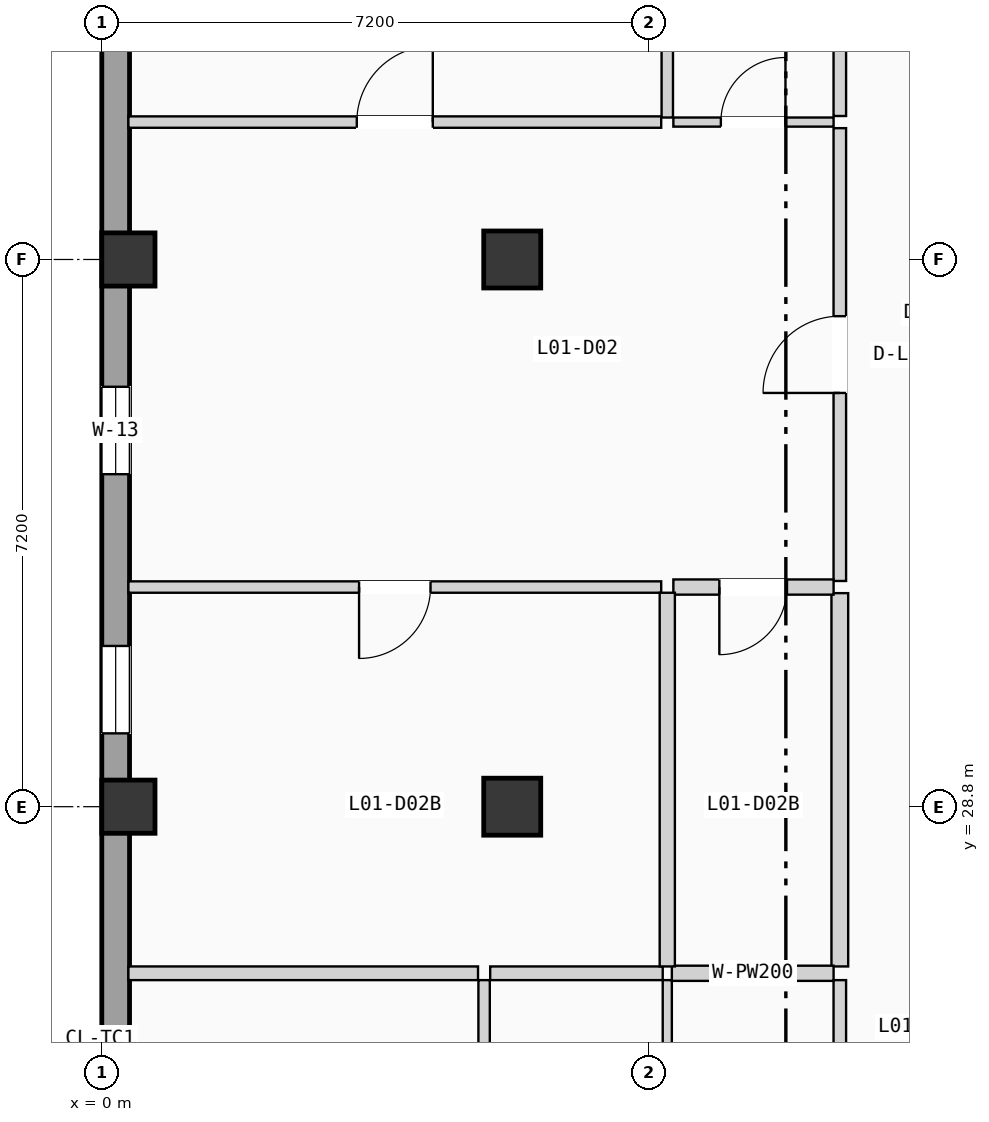
"""IFC4 building model, lengths in metres.
Left out: names, types, materials, properties, quantities, classifications, styles, units other than length and angle.
Written with IfcOpenShell. Run it as: python <this file> out.ifc"""

import sys

from ifc_helpers import new_model, si_unit, direction, frame, frame_2d, origin, origin_2d, place, context, subcontext, project, spatial, rectangle, extrude, element, fill, save


model = new_model("IFC4")
c1 = context("Model", 3, precision=1e-05, world=origin(), true_north=direction((0.0, 1.0)))
c2 = subcontext(c1, "Body", "Model", "MODEL_VIEW")
j1 = project(units=[si_unit("LENGTHUNIT", "METRE"), si_unit("PLANEANGLEUNIT", "RADIAN")], contexts=[c1])
p1 = place(None, origin())
s1 = spatial("IfcSite", under=j1, at=p1, CompositionType="ELEMENT")
p2 = place(p1, origin())
s2 = spatial("IfcBuilding", under=s1, at=p2, CompositionType="ELEMENT")
p3 = place(p2, frame((0.0, 0.0, 4.9)))
s3 = spatial("IfcBuildingStorey", under=s2, at=p3, CompositionType="ELEMENT", Elevation=4.9)
for number, where, z_axis, x_axis in (
    (1, (0.35, 28.8, 0.0), (0.0, 0.0, 1.0), (1.0, 0.0, 0.0)),
    (2, (0.35, 36.0, 0.0), (0.0, 0.0, 1.0), (1.0, 0.0, 0.0)),
):
    element("IfcColumn", number, at=place(p3, frame(where, z_axis=z_axis, x_axis=x_axis)), inside=s3, PredefinedType="COLUMN", context=c2, shape_type="SweptSolid", body=[
        extrude(rectangle(XDim=0.7, YDim=0.7, at=origin_2d()), origin(), (0.0, 0.0, 1.0), 3.675),
    ])
for number, where, z_axis, x_axis in (
    (3, (5.4, 28.8, 0.0), (0.0, 0.0, 1.0), (1.0, 0.0, 0.0)),
    (4, (5.4, 36.0, 0.0), (0.0, 0.0, 1.0), (1.0, 0.0, 0.0)),
):
    element("IfcColumn", number, at=place(p3, frame(where, z_axis=z_axis, x_axis=x_axis)), inside=s3, PredefinedType="COLUMN", context=c2, shape_type="SweptSolid", body=[
        extrude(rectangle(XDim=0.75, YDim=0.75, at=origin_2d()), origin(), (0.0, 0.0, 1.0), 3.675),
    ])
p4 = place(p3, frame((0.183, 0.365, 0.0), z_axis=(0.0, 0.0, 1.0), x_axis=(0.0, 1.0, 0.0)))
e5 = element("IfcWall", 5, at=p4, inside=s3, PredefinedType="SOLIDWALL", context=c2, shape_type="SweptSolid", body=[
    extrude(rectangle(XDim=49.67, YDim=0.365, at=frame_2d((24.835, 0.0))), origin(), (0.0, 0.0, 1.0), 3.415),
])
p5 = place(p4, frame((16.732, 0.0, 0.9)))
e6 = element("IfcOpeningElement", 6, at=p5, cuts=e5, PredefinedType="OPENING", context=c2, shape_type="SweptSolid", body=[
    extrude(rectangle(XDim=1.05, YDim=1.8, at=frame_2d((0.525, 0.9))), frame((0.0, 0.192, 0.0), z_axis=(0.0, -1.0, 0.0), x_axis=(1.0, 0.0, 0.0)), (0.0, 0.0, 1.0), 0.385),
])
p6 = place(p4, frame((9.553, 0.0, 0.9)))
e7 = element("IfcOpeningElement", 7, at=p6, cuts=e5, PredefinedType="OPENING", context=c2, shape_type="SweptSolid", body=[
    extrude(rectangle(XDim=1.15, YDim=1.2, at=frame_2d((0.575, 0.6))), frame((0.0, 0.192, 0.0), z_axis=(0.0, -1.0, 0.0), x_axis=(1.0, 0.0, 0.0)), (0.0, 0.0, 1.0), 0.385),
])
p7 = place(p4, frame((23.254, 0.0, 0.9)))
e8 = element("IfcOpeningElement", 8, at=p7, cuts=e5, PredefinedType="OPENING", context=c2, shape_type="SweptSolid", body=[
    extrude(rectangle(XDim=1.15, YDim=1.35, at=frame_2d((0.575, 0.675))), frame((0.0, 0.192, 0.0), z_axis=(0.0, -1.0, 0.0), x_axis=(1.0, 0.0, 0.0)), (0.0, 0.0, 1.0), 0.385),
])
p8 = place(p4, frame((32.81, 0.0, 0.9)))
e9 = element("IfcOpeningElement", 9, at=p8, cuts=e5, PredefinedType="OPENING", context=c2, shape_type="SweptSolid", body=[
    extrude(rectangle(XDim=1.15, YDim=1.5, at=frame_2d((0.575, 0.75))), frame((0.0, 0.192, 0.0), z_axis=(0.0, -1.0, 0.0), x_axis=(1.0, 0.0, 0.0)), (0.0, 0.0, 1.0), 0.385),
])
p9 = place(p4, frame((29.4, 0.0, 0.9)))
e10 = element("IfcOpeningElement", 10, at=p9, cuts=e5, PredefinedType="OPENING", context=c2, shape_type="SweptSolid", body=[
    extrude(rectangle(XDim=1.15, YDim=1.65, at=frame_2d((0.575, 0.825))), frame((0.0, 0.192, 0.0), z_axis=(0.0, -1.0, 0.0), x_axis=(1.0, 0.0, 0.0)), (0.0, 0.0, 1.0), 0.385),
])
p10 = place(p4, frame((39.404, 0.0, 0.9)))
e11 = element("IfcOpeningElement", 11, at=p10, cuts=e5, PredefinedType="OPENING", context=c2, shape_type="SweptSolid", body=[
    extrude(rectangle(XDim=1.15, YDim=1.8, at=frame_2d((0.575, 0.9))), frame((0.0, 0.192, 0.0), z_axis=(0.0, -1.0, 0.0), x_axis=(1.0, 0.0, 0.0)), (0.0, 0.0, 1.0), 0.385),
])
p11 = place(p3, frame((9.71, 20.733, 0.0), z_axis=(0.0, 0.0, 1.0), x_axis=(0.0, 1.0, 0.0)))
e12 = element("IfcWall", 12, at=p11, inside=s3, PredefinedType="PARTITIONING", context=c2, shape_type="SweptSolid", body=[
    extrude(rectangle(XDim=5.785, YDim=0.165, at=frame_2d((2.893, 0.0))), origin(), (0.0, 0.0, 1.0), 3.395),
])
p12 = place(p3, frame((9.71, 31.77, 0.0), z_axis=(0.0, 0.0, 1.0), x_axis=(0.0, 1.0, 0.0)))
e13 = element("IfcWall", 13, at=p12, inside=s3, PredefinedType="PARTITIONING", context=c2, shape_type="SweptSolid", body=[
    extrude(rectangle(XDim=5.958, YDim=0.165, at=frame_2d((2.979, 0.0))), origin(), (0.0, 0.0, 1.0), 3.395),
])
p13 = place(p12, frame((2.474, 0.0, 0.0)))
e14 = element("IfcOpeningElement", 14, at=p13, cuts=e13, PredefinedType="OPENING", context=c2, shape_type="SweptSolid", body=[
    extrude(rectangle(XDim=1.01, YDim=2.11, at=frame_2d((0.505, 1.055))), frame((0.0, 0.093, 0.0), z_axis=(0.0, -1.0, 0.0), x_axis=(1.0, 0.0, 0.0)), (0.0, 0.0, 1.0), 0.185),
])
p14 = place(p3, frame((9.71, 26.698, 0.0), z_axis=(0.0, 0.0, 1.0), x_axis=(0.0, 1.0, 0.0)))
e15 = element("IfcWall", 15, at=p14, inside=s3, PredefinedType="PLUMBINGWALL", context=c2, shape_type="SweptSolid", body=[
    extrude(rectangle(XDim=4.912, YDim=0.22, at=frame_2d((2.456, 0.0))), origin(), (0.0, 0.0, 1.0), 3.395),
])
p15 = place(p3, frame((9.71, 37.888, 0.0), z_axis=(0.0, 0.0, 1.0), x_axis=(0.0, 1.0, 0.0)))
e16 = element("IfcWall", 16, at=p15, inside=s3, PredefinedType="PARTITIONING", context=c2, shape_type="SweptSolid", body=[
    extrude(rectangle(XDim=4.912, YDim=0.165, at=frame_2d((2.456, 0.0))), origin(), (0.0, 0.0, 1.0), 3.395),
])
p16 = place(p3, frame((7.44, 20.713, 0.0), z_axis=(0.0, 0.0, 1.0), x_axis=(0.0, 1.0, 0.0)))
e17 = element("IfcWall", 17, at=p16, inside=s3, PredefinedType="PARTITIONING", context=c2, shape_type="SweptSolid", body=[
    extrude(rectangle(XDim=5.805, YDim=0.12, at=frame_2d((2.903, 0.0))), origin(), (0.0, 0.0, 1.0), 3.395),
])
p17 = place(p3, frame((7.5, 26.608, 0.0), z_axis=(0.0, 0.0, 1.0), x_axis=(1.0, 0.0, 0.0)))
e18 = element("IfcWall", 18, at=p17, inside=s3, PredefinedType="PLUMBINGWALL", context=c2, shape_type="SweptSolid", body=[
    extrude(rectangle(XDim=2.128, YDim=0.2, at=frame_2d((1.064, 0.0))), origin(), (0.0, 0.0, 1.0), 3.395),
])
p18 = place(p3, frame((5.03, 20.728, 0.0), z_axis=(0.0, 0.0, 1.0), x_axis=(0.0, 1.0, 0.0)))
e19 = element("IfcWall", 19, at=p18, inside=s3, PredefinedType="PARTITIONING", context=c2, shape_type="SweptSolid", body=[
    extrude(rectangle(XDim=5.79, YDim=0.15, at=frame_2d((2.895, 0.0))), origin(), (0.0, 0.0, 1.0), 3.395),
])
p19 = place(p3, frame((0.35, 26.608, 0.0), z_axis=(0.0, 0.0, 1.0), x_axis=(1.0, 0.0, 0.0)))
e20 = element("IfcWall", 20, at=p19, inside=s3, PredefinedType="PARTITIONING", context=c2, shape_type="SweptSolid", body=[
    extrude(rectangle(XDim=4.6, YDim=0.18, at=frame_2d((2.3, 0.0))), origin(), (0.0, 0.0, 1.0), 3.395),
])
p20 = place(p3, frame((5.11, 26.608, 0.0), z_axis=(0.0, 0.0, 1.0), x_axis=(1.0, 0.0, 0.0)))
e21 = element("IfcWall", 21, at=p20, inside=s3, PredefinedType="PARTITIONING", context=c2, shape_type="SweptSolid", body=[
    extrude(rectangle(XDim=2.27, YDim=0.18, at=frame_2d((1.135, 0.0))), origin(), (0.0, 0.0, 1.0), 3.395),
])
p21 = place(p3, frame((7.52, 31.69, 0.0), z_axis=(0.0, 0.0, 1.0), x_axis=(1.0, 0.0, 0.0)))
e22 = element("IfcWall", 22, at=p21, inside=s3, PredefinedType="PLUMBINGWALL", context=c2, shape_type="SweptSolid", body=[
    extrude(rectangle(XDim=2.108, YDim=0.2, at=frame_2d((1.054, 0.0))), origin(), (0.0, 0.0, 1.0), 3.395),
])
p22 = place(p21, frame((0.605, 0.0, 0.0)))
e23 = element("IfcOpeningElement", 23, at=p22, cuts=e22, PredefinedType="OPENING", context=c2, shape_type="SweptSolid", body=[
    extrude(rectangle(XDim=0.89, YDim=2.03, at=frame_2d((0.445, 1.015))), frame((0.0, 0.11, 0.0), z_axis=(0.0, -1.0, 0.0), x_axis=(1.0, 0.0, 0.0)), (0.0, 0.0, 1.0), 0.22),
])
p23 = place(p3, frame((7.52, 37.808, 0.0), z_axis=(0.0, 0.0, 1.0), x_axis=(1.0, 0.0, 0.0)))
e24 = element("IfcWall", 24, at=p23, inside=s3, PredefinedType="PARTITIONING", context=c2, shape_type="SweptSolid", body=[
    extrude(rectangle(XDim=2.108, YDim=0.12, at=frame_2d((1.054, 0.0))), origin(), (0.0, 0.0, 1.0), 3.395),
])
p24 = place(p23, frame((0.625, 0.0, 0.0)))
e25 = element("IfcOpeningElement", 25, at=p24, cuts=e24, PredefinedType="OPENING", context=c2, shape_type="SweptSolid", body=[
    extrude(rectangle(XDim=0.85, YDim=2.01, at=frame_2d((0.425, 1.005))), frame((0.0, 0.07, 0.0), z_axis=(0.0, -1.0, 0.0), x_axis=(1.0, 0.0, 0.0)), (0.0, 0.0, 1.0), 0.14),
])
p25 = place(p3, frame((0.35, 31.69, 0.0), z_axis=(0.0, 0.0, 1.0), x_axis=(1.0, 0.0, 0.0)))
e26 = element("IfcWall", 26, at=p25, inside=s3, PredefinedType="PARTITIONING", context=c2, shape_type="SweptSolid", body=[
    extrude(rectangle(XDim=7.01, YDim=0.15, at=frame_2d((3.505, 0.0))), origin(), (0.0, 0.0, 1.0), 3.395),
])
p26 = place(p25, frame((3.035, 0.0, 0.0)))
e27 = element("IfcOpeningElement", 27, at=p26, cuts=e26, PredefinedType="OPENING", context=c2, shape_type="SweptSolid", body=[
    extrude(rectangle(XDim=0.94, YDim=2.06, at=frame_2d((0.47, 1.03))), frame((0.0, 0.085, 0.0), z_axis=(0.0, -1.0, 0.0), x_axis=(1.0, 0.0, 0.0)), (0.0, 0.0, 1.0), 0.17),
])
p27 = place(p3, frame((0.35, 37.808, 0.0), z_axis=(0.0, 0.0, 1.0), x_axis=(1.0, 0.0, 0.0)))
e28 = element("IfcWall", 28, at=p27, inside=s3, PredefinedType="PARTITIONING", context=c2, shape_type="SweptSolid", body=[
    extrude(rectangle(XDim=7.01, YDim=0.15, at=frame_2d((3.505, 0.0))), origin(), (0.0, 0.0, 1.0), 3.395),
])
p28 = place(p27, frame((3.005, 0.0, 0.0)))
e29 = element("IfcOpeningElement", 29, at=p28, cuts=e28, PredefinedType="OPENING", context=c2, shape_type="SweptSolid", body=[
    extrude(rectangle(XDim=1.0, YDim=2.06, at=frame_2d((0.5, 1.03))), frame((0.0, 0.085, 0.0), z_axis=(0.0, -1.0, 0.0), x_axis=(1.0, 0.0, 0.0)), (0.0, 0.0, 1.0), 0.17),
])
p29 = place(p3, frame((7.44, 26.698, 0.0), z_axis=(0.0, 0.0, 1.0), x_axis=(0.0, 1.0, 0.0)))
e30 = element("IfcWall", 30, at=p29, inside=s3, PredefinedType="PLUMBINGWALL", context=c2, shape_type="SweptSolid", body=[
    extrude(rectangle(XDim=4.917, YDim=0.2, at=frame_2d((2.458, 0.0))), origin(), (0.0, 0.0, 1.0), 3.395),
])
p30 = place(p3, frame((7.44, 37.868, 0.0), z_axis=(0.0, 0.0, 1.0), x_axis=(0.0, 1.0, 0.0)))
e31 = element("IfcWall", 31, at=p30, inside=s3, PredefinedType="PARTITIONING", context=c2, shape_type="SweptSolid", body=[
    extrude(rectangle(XDim=4.932, YDim=0.15, at=frame_2d((2.466, 0.0))), origin(), (0.0, 0.0, 1.0), 3.395),
])
p31 = place(p8, origin())
e32 = element("IfcWindow", 32, at=p31, inside=s3, PartitioningType="SINGLE_PANEL", PredefinedType="WINDOW", context=c2, shape_type="SweptSolid", body=[
    extrude(rectangle(XDim=1.15, YDim=1.5, at=frame_2d((0.575, 0.75))), frame((0.0, 0.03, 0.0), z_axis=(0.0, -1.0, 0.0), x_axis=(1.0, 0.0, 0.0)), (0.0, 0.0, 1.0), 0.06),
])
fill(e9, e32)
p32 = place(p9, origin())
e33 = element("IfcWindow", 33, at=p32, inside=s3, PartitioningType="SINGLE_PANEL", PredefinedType="WINDOW", context=c2, shape_type="SweptSolid", body=[
    extrude(rectangle(XDim=1.15, YDim=1.65, at=frame_2d((0.575, 0.825))), frame((0.0, 0.03, 0.0), z_axis=(0.0, -1.0, 0.0), x_axis=(1.0, 0.0, 0.0)), (0.0, 0.0, 1.0), 0.06),
])
fill(e10, e33)
p33 = place(p13, origin())
e34 = element("IfcDoor", 34, at=p33, inside=s3, OperationType="SINGLE_SWING_LEFT", PredefinedType="DOOR", context=c2, shape_type="SweptSolid", body=[
    extrude(rectangle(XDim=1.01, YDim=2.11, at=frame_2d((0.505, 1.055))), frame((0.0, 0.025, 0.0), z_axis=(0.0, -1.0, 0.0), x_axis=(1.0, 0.0, 0.0)), (0.0, 0.0, 1.0), 0.05),
])
fill(e14, e34)
p34 = place(p22, frame((0.89, 0.0, 0.0), z_axis=(0.0, 0.0, 1.0), x_axis=(-1.0, 0.0, 0.0)))
e35 = element("IfcDoor", 35, at=p34, inside=s3, OperationType="SINGLE_SWING_LEFT", PredefinedType="DOOR", context=c2, shape_type="SweptSolid", body=[
    extrude(rectangle(XDim=0.89, YDim=2.03, at=frame_2d((0.445, 1.015))), frame((0.0, 0.025, 0.0), z_axis=(0.0, -1.0, 0.0), x_axis=(1.0, 0.0, 0.0)), (0.0, 0.0, 1.0), 0.05),
])
fill(e23, e35)
p35 = place(p24, origin())
e36 = element("IfcDoor", 36, at=p35, inside=s3, OperationType="SINGLE_SWING_RIGHT", PredefinedType="DOOR", context=c2, shape_type="SweptSolid", body=[
    extrude(rectangle(XDim=0.85, YDim=2.01, at=frame_2d((0.425, 1.005))), frame((0.0, 0.025, 0.0), z_axis=(0.0, -1.0, 0.0), x_axis=(1.0, 0.0, 0.0)), (0.0, 0.0, 1.0), 0.05),
])
fill(e25, e36)
p36 = place(p26, frame((0.94, 0.0, 0.0), z_axis=(0.0, 0.0, 1.0), x_axis=(-1.0, 0.0, 0.0)))
e37 = element("IfcDoor", 37, at=p36, inside=s3, OperationType="SINGLE_SWING_LEFT", PredefinedType="DOOR", context=c2, shape_type="SweptSolid", body=[
    extrude(rectangle(XDim=0.94, YDim=2.06, at=frame_2d((0.47, 1.03))), frame((0.0, 0.025, 0.0), z_axis=(0.0, -1.0, 0.0), x_axis=(1.0, 0.0, 0.0)), (0.0, 0.0, 1.0), 0.05),
])
fill(e27, e37)
p37 = place(p28, origin())
e38 = element("IfcDoor", 38, at=p37, inside=s3, OperationType="SINGLE_SWING_RIGHT", PredefinedType="DOOR", context=c2, shape_type="SweptSolid", body=[
    extrude(rectangle(XDim=1.0, YDim=2.06, at=frame_2d((0.5, 1.03))), frame((0.0, 0.025, 0.0), z_axis=(0.0, -1.0, 0.0), x_axis=(1.0, 0.0, 0.0)), (0.0, 0.0, 1.0), 0.05),
])
fill(e29, e38)
save(model, sys.argv[1])
